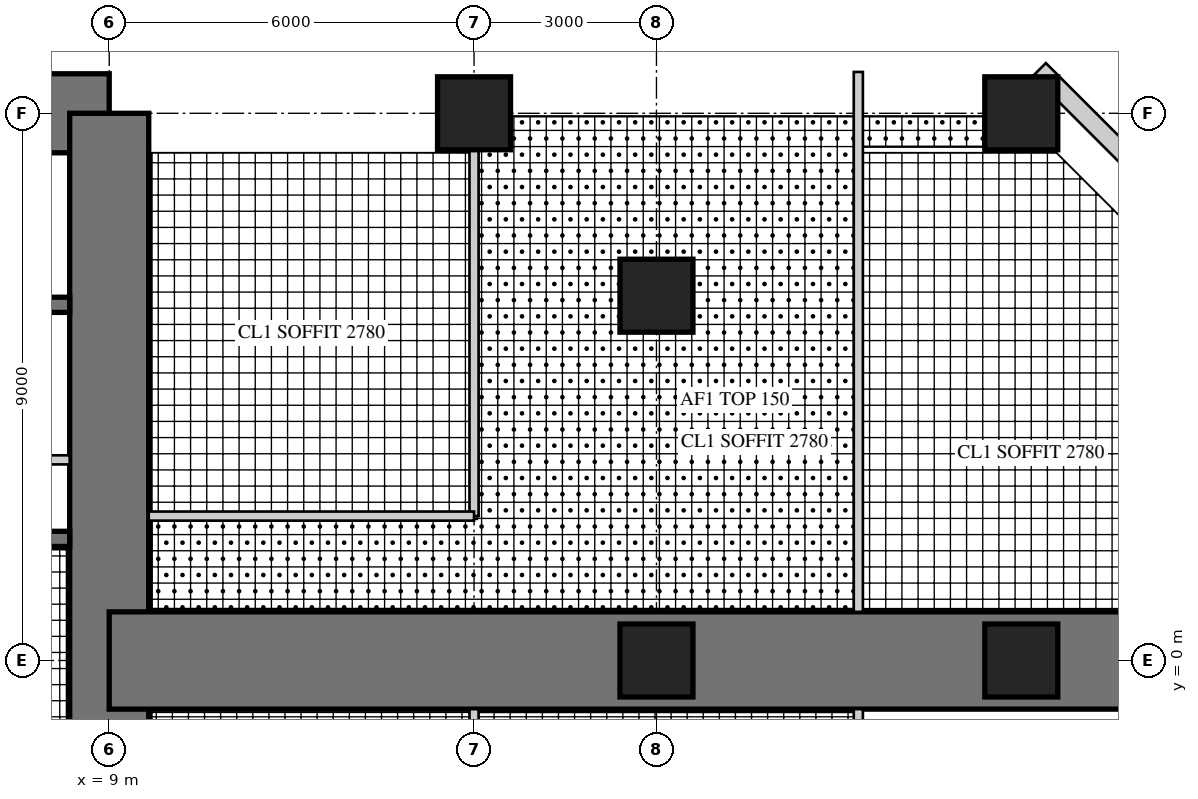
"""IFC4 building model, lengths in metres.
Left out: names, types, materials, properties, quantities, classifications, styles, units other than length and angle.
Written with IfcOpenShell. Run it as: python <this file> out.ifc"""

import sys

from ifc_helpers import new_model, si_unit, direction, frame, frame_2d, origin, origin_2d, place, context, subcontext, project, spatial, rectangle, extrude, element, fill, save


model = new_model("IFC4")
c1 = context("Model", 3, precision=1e-05, world=origin(), true_north=direction((0.0, 1.0)))
c2 = subcontext(c1, "Body", "Model", "MODEL_VIEW")
j1 = project(units=[si_unit("LENGTHUNIT", "METRE"), si_unit("PLANEANGLEUNIT", "RADIAN")], contexts=[c1])
p1 = place(None, origin())
s1 = spatial("IfcSite", under=j1, at=p1, CompositionType="ELEMENT")
p2 = place(p1, origin())
s2 = spatial("IfcBuilding", under=s1, at=p2, CompositionType="ELEMENT")
p3 = place(p2, frame((0.0, 0.0, 27.5)))
s3 = spatial("IfcBuildingStorey", under=s2, at=p3, CompositionType="ELEMENT", Elevation=27.5)
p4 = place(p3, frame((9.0, 9.0, 0.0), z_axis=(0.0, 0.0, 1.0), x_axis=(-1.0, 0.0, 0.0)))
e1 = element("IfcWall", 1, at=p4, inside=s3, PredefinedType="SHEAR", context=c2, shape_type="SweptSolid", body=[
    extrude(rectangle(XDim=18.0, YDim=1.3, at=frame_2d((9.0, 0.0))), origin(), (0.0, 0.0, 1.0), 4.0),
])
p5 = place(p4, frame((9.8, 0.0, 0.0)))
e2 = element("IfcOpeningElement", 2, at=p5, cuts=e1, PredefinedType="OPENING", context=c2, shape_type="SweptSolid", body=[
    extrude(rectangle(XDim=1.0, YDim=2.4, at=frame_2d((0.5, 1.2))), frame((0.0, 0.66, 0.0), z_axis=(0.0, -1.0, 0.0), x_axis=(1.0, 0.0, 0.0)), (0.0, 0.0, 1.0), 1.32),
])
p6 = place(p3, frame((9.0, -9.0, 0.0), z_axis=(0.0, 0.0, 1.0), x_axis=(0.0, 1.0, 0.0)))
e3 = element("IfcWall", 3, at=p6, inside=s3, PredefinedType="SHEAR", context=c2, shape_type="SweptSolid", body=[
    extrude(rectangle(XDim=18.0, YDim=1.3, at=frame_2d((9.0, 0.0))), origin(), (0.0, 0.0, 1.0), 4.0),
])
p7 = place(p6, frame((9.8, 0.0, 0.0)))
e4 = element("IfcOpeningElement", 4, at=p7, cuts=e3, PredefinedType="OPENING", context=c2, shape_type="SweptSolid", body=[
    extrude(rectangle(XDim=1.0, YDim=2.4, at=frame_2d((0.5, 1.2))), frame((0.0, 0.66, 0.0), z_axis=(0.0, -1.0, 0.0), x_axis=(1.0, 0.0, 0.0)), (0.0, 0.0, 1.0), 1.32),
])
p8 = place(p3, frame((1.925, 2.0, 0.0), z_axis=(0.0, 0.0, 1.0), x_axis=(1.0, 0.0, 0.0)))
e5 = element("IfcWall", 5, at=p8, inside=s3, PredefinedType="SHEAR", context=c2, shape_type="SweptSolid", body=[
    extrude(rectangle(XDim=6.425, YDim=0.25, at=frame_2d((3.212, 0.0))), origin(), (0.0, 0.0, 1.0), 4.0),
])
p9 = place(p3, frame((1.925, 5.85, 0.0), z_axis=(0.0, 0.0, 1.0), x_axis=(1.0, 0.0, 0.0)))
e6 = element("IfcWall", 6, at=p9, inside=s3, PredefinedType="SHEAR", context=c2, shape_type="SweptSolid", body=[
    extrude(rectangle(XDim=6.425, YDim=0.25, at=frame_2d((3.212, 0.0))), origin(), (0.0, 0.0, 1.0), 4.0),
])
p10 = place(p9, frame((0.454, 0.0, 0.0)))
e7 = element("IfcOpeningElement", 7, at=p10, cuts=e6, PredefinedType="OPENING", context=c2, shape_type="SweptSolid", body=[
    extrude(rectangle(XDim=1.1, YDim=2.2, at=frame_2d((0.55, 1.1))), frame((0.0, 0.135, 0.0), z_axis=(0.0, -1.0, 0.0), x_axis=(1.0, 0.0, 0.0)), (0.0, 0.0, 1.0), 0.27),
])
p11 = place(p9, frame((2.663, 0.0, 0.0)))
e8 = element("IfcOpeningElement", 8, at=p11, cuts=e6, PredefinedType="OPENING", context=c2, shape_type="SweptSolid", body=[
    extrude(rectangle(XDim=1.1, YDim=2.2, at=frame_2d((0.55, 1.1))), frame((0.0, 0.135, 0.0), z_axis=(0.0, -1.0, 0.0), x_axis=(1.0, 0.0, 0.0)), (0.0, 0.0, 1.0), 0.27),
])
p12 = place(p9, frame((4.871, 0.0, 0.0)))
e9 = element("IfcOpeningElement", 9, at=p12, cuts=e6, PredefinedType="OPENING", context=c2, shape_type="SweptSolid", body=[
    extrude(rectangle(XDim=1.1, YDim=2.2, at=frame_2d((0.55, 1.1))), frame((0.0, 0.135, 0.0), z_axis=(0.0, -1.0, 0.0), x_axis=(1.0, 0.0, 0.0)), (0.0, 0.0, 1.0), 0.27),
])
p13 = place(p3, frame((1.925, 3.3, 0.0), z_axis=(0.0, 0.0, 1.0), x_axis=(1.0, 0.0, 0.0)))
e10 = element("IfcWall", 10, at=p13, inside=s3, PredefinedType="PARTITIONING", context=c2, shape_type="SweptSolid", body=[
    extrude(rectangle(XDim=6.425, YDim=0.15, at=frame_2d((3.212, 0.0))), origin(), (0.0, 0.0, 1.0), 4.0),
])
p14 = place(p13, frame((0.075, 0.0, 0.0)))
e11 = element("IfcOpeningElement", 11, at=p14, cuts=e10, PredefinedType="OPENING", context=c2, shape_type="SweptSolid", body=[
    extrude(rectangle(XDim=0.8, YDim=2.1, at=frame_2d((0.4, 1.05))), frame((0.0, 0.085, 0.0), z_axis=(0.0, -1.0, 0.0), x_axis=(1.0, 0.0, 0.0)), (0.0, 0.0, 1.0), 0.17),
])
p15 = place(p13, frame((3.675, 0.0, 0.0)))
e12 = element("IfcOpeningElement", 12, at=p15, cuts=e10, PredefinedType="OPENING", context=c2, shape_type="SweptSolid", body=[
    extrude(rectangle(XDim=0.8, YDim=2.1, at=frame_2d((0.4, 1.05))), frame((0.0, 0.085, 0.0), z_axis=(0.0, -1.0, 0.0), x_axis=(1.0, 0.0, 0.0)), (0.0, 0.0, 1.0), 0.17),
])
p16 = place(p3, frame((9.0, 0.0, 0.0), z_axis=(0.0, 0.0, 1.0), x_axis=(1.0, 0.0, 0.0)))
e13 = element("IfcWall", 13, at=p16, inside=s3, PredefinedType="SHEAR", context=c2, shape_type="SweptSolid", body=[
    extrude(rectangle(XDim=18.0, YDim=1.6, at=frame_2d((9.0, 0.0))), origin(), (0.0, 0.0, 1.0), 4.0),
])
p17 = place(p16, frame((9.9, 0.0, 0.0)))
e14 = element("IfcOpeningElement", 14, at=p17, cuts=e13, PredefinedType="OPENING", context=c2, shape_type="SweptSolid", body=[
    extrude(rectangle(XDim=1.0, YDim=2.2, at=frame_2d((0.5, 1.1))), frame((0.0, 0.81, 0.0), z_axis=(0.0, -1.0, 0.0), x_axis=(1.0, 0.0, 0.0)), (0.0, 0.0, 1.0), 1.62),
])
for number, where, z_axis, x_axis in (
    (15, (15.0, 9.0, 0.0), (0.0, 0.0, 1.0), (1.0, 0.0, 0.0)),
    (16, (24.0, 9.0, 0.0), (0.0, 0.0, 1.0), (1.0, 0.0, 0.0)),
    (17, (18.0, 0.0, 0.0), (0.0, 0.0, 1.0), (1.0, 0.0, 0.0)),
    (18, (18.0, 6.0, 0.0), (0.0, 0.0, 1.0), (1.0, 0.0, 0.0)),
    (19, (24.0, 0.0, 0.0), (0.0, 0.0, 1.0), (1.0, 0.0, 0.0)),
):
    element("IfcColumn", number, at=place(p3, frame(where, z_axis=z_axis, x_axis=x_axis)), inside=s3, PredefinedType="COLUMN", context=c2, shape_type="SweptSolid", body=[
        extrude(rectangle(XDim=1.2, YDim=1.2, at=origin_2d()), origin(), (0.0, 0.0, 1.0), 4.0),
    ])
p18 = place(p3, frame((27.6, 6.418, 0.0), z_axis=(0.0, 0.0, 1.0), x_axis=(-0.707106781187, 0.707106781187, 0.0)))
e20 = element("IfcWall", 20, at=p18, inside=s3, PredefinedType="SOLIDWALL", context=c2, shape_type="SweptSolid", body=[
    extrude(rectangle(XDim=4.669, YDim=0.3, at=frame_2d((2.335, 0.0))), origin(), (0.0, 0.0, 1.0), 3.8),
])
p19 = place(p18, frame((1.885, 0.0, 0.3)))
e21 = element("IfcOpeningElement", 21, at=p19, cuts=e20, PredefinedType="OPENING", context=c2, shape_type="SweptSolid", body=[
    extrude(rectangle(XDim=0.9, YDim=2.4, at=frame_2d((0.45, 1.2))), frame((0.0, 0.16, 0.0), z_axis=(0.0, -1.0, 0.0), x_axis=(1.0, 0.0, 0.0)), (0.0, 0.0, 1.0), 0.32),
])
p20 = place(p3, frame((15.0, 2.375, 0.0), z_axis=(0.0, 0.0, 1.0), x_axis=(0.0, 1.0, 0.0)))
e22 = element("IfcWall", 22, at=p20, inside=s3, PredefinedType="PARTITIONING", context=c2, shape_type="SweptSolid", body=[
    extrude(rectangle(XDim=6.025, YDim=0.15, at=frame_2d((3.012, 0.0))), origin(), (0.0, 0.0, 1.0), 2.95),
])
p21 = place(p20, frame((2.512, 0.0, 0.0)))
e23 = element("IfcOpeningElement", 23, at=p21, cuts=e22, PredefinedType="OPENING", context=c2, shape_type="SweptSolid", body=[
    extrude(rectangle(XDim=1.0, YDim=2.1, at=frame_2d((0.5, 1.05))), frame((0.0, 0.085, 0.0), z_axis=(0.0, -1.0, 0.0), x_axis=(1.0, 0.0, 0.0)), (0.0, 0.0, 1.0), 0.17),
])
p22 = place(p3, frame((9.65, 2.375, 0.0), z_axis=(0.0, 0.0, 1.0), x_axis=(1.0, 0.0, 0.0)))
e24 = element("IfcWall", 24, at=p22, inside=s3, PredefinedType="PARTITIONING", context=c2, shape_type="SweptSolid", body=[
    extrude(rectangle(XDim=5.35, YDim=0.15, at=frame_2d((2.675, 0.0))), origin(), (0.0, 0.0, 1.0), 3.8),
])
p23 = place(p3, frame((15.0, -8.4, 0.0), z_axis=(0.0, 0.0, 1.0), x_axis=(0.0, 1.0, 0.0)))
e25 = element("IfcWall", 25, at=p23, inside=s3, PredefinedType="PARTITIONING", context=c2, shape_type="SweptSolid", body=[
    extrude(rectangle(XDim=7.6, YDim=0.15, at=frame_2d((3.8, 0.0))), origin(), (0.0, 0.0, 1.0), 2.95),
])
p24 = place(p23, frame((1.375, 0.0, 0.0)))
e26 = element("IfcOpeningElement", 26, at=p24, cuts=e25, PredefinedType="OPENING", context=c2, shape_type="SweptSolid", body=[
    extrude(rectangle(XDim=1.0, YDim=2.1, at=frame_2d((0.5, 1.05))), frame((0.0, 0.085, 0.0), z_axis=(0.0, -1.0, 0.0), x_axis=(1.0, 0.0, 0.0)), (0.0, 0.0, 1.0), 0.17),
])
p25 = place(p23, frame((5.175, 0.0, 0.0)))
e27 = element("IfcOpeningElement", 27, at=p25, cuts=e25, PredefinedType="OPENING", context=c2, shape_type="SweptSolid", body=[
    extrude(rectangle(XDim=1.0, YDim=2.1, at=frame_2d((0.5, 1.05))), frame((0.0, 0.085, 0.0), z_axis=(0.0, -1.0, 0.0), x_axis=(1.0, 0.0, 0.0)), (0.0, 0.0, 1.0), 0.17),
])
p26 = place(p3, frame((21.32, 0.8, 0.0), z_axis=(0.0, 0.0, 1.0), x_axis=(0.0, 1.0, 0.0)))
e28 = element("IfcWall", 28, at=p26, inside=s3, PredefinedType="PARTITIONING", context=c2, shape_type="SweptSolid", body=[
    extrude(rectangle(XDim=8.88, YDim=0.15, at=frame_2d((4.44, 0.0))), origin(), (0.0, 0.0, 1.0), 3.8),
])
p27 = place(p26, frame((0.45, 0.0, 0.0)))
e29 = element("IfcOpeningElement", 29, at=p27, cuts=e28, PredefinedType="OPENING", context=c2, shape_type="SweptSolid", body=[
    extrude(rectangle(XDim=1.0, YDim=2.2, at=frame_2d((0.5, 1.1))), frame((0.0, 0.085, 0.0), z_axis=(0.0, -1.0, 0.0), x_axis=(1.0, 0.0, 0.0)), (0.0, 0.0, 1.0), 0.17),
])
p28 = place(p3, frame((21.32, -9.68, 0.0), z_axis=(0.0, 0.0, 1.0), x_axis=(0.0, 1.0, 0.0)))
e30 = element("IfcWall", 30, at=p28, inside=s3, PredefinedType="PARTITIONING", context=c2, shape_type="SweptSolid", body=[
    extrude(rectangle(XDim=8.88, YDim=0.15, at=frame_2d((4.44, 0.0))), origin(), (0.0, 0.0, 1.0), 3.8),
])
p29 = place(p28, frame((5.087, 0.0, 0.0)))
e31 = element("IfcOpeningElement", 31, at=p29, cuts=e30, PredefinedType="OPENING", context=c2, shape_type="SweptSolid", body=[
    extrude(rectangle(XDim=1.0, YDim=2.2, at=frame_2d((0.5, 1.1))), frame((0.0, 0.085, 0.0), z_axis=(0.0, -1.0, 0.0), x_axis=(1.0, 0.0, 0.0)), (0.0, 0.0, 1.0), 0.17),
])
p30 = place(p28, frame((7.53, 0.0, 0.0)))
e32 = element("IfcOpeningElement", 32, at=p30, cuts=e30, PredefinedType="OPENING", context=c2, shape_type="SweptSolid", body=[
    extrude(rectangle(XDim=1.0, YDim=2.2, at=frame_2d((0.5, 1.1))), frame((0.0, 0.085, 0.0), z_axis=(0.0, -1.0, 0.0), x_axis=(1.0, 0.0, 0.0)), (0.0, 0.0, 1.0), 0.17),
])
p31 = place(p21, origin())
e33 = element("IfcDoor", 33, at=p31, inside=s3, OperationType="SINGLE_SWING_LEFT", PredefinedType="DOOR", context=c2, shape_type="SweptSolid", body=[
    extrude(rectangle(XDim=1.0, YDim=2.1, at=frame_2d((0.5, 1.05))), frame((0.0, 0.025, 0.0), z_axis=(0.0, -1.0, 0.0), x_axis=(1.0, 0.0, 0.0)), (0.0, 0.0, 1.0), 0.05),
])
fill(e23, e33)
p32 = place(p27, frame((1.0, 0.0, 0.0), z_axis=(0.0, 0.0, 1.0), x_axis=(-1.0, 0.0, 0.0)))
e34 = element("IfcDoor", 34, at=p32, inside=s3, OperationType="SINGLE_SWING_RIGHT", PredefinedType="DOOR", context=c2, shape_type="SweptSolid", body=[
    extrude(rectangle(XDim=1.0, YDim=2.2, at=frame_2d((0.5, 1.1))), frame((0.0, 0.025, 0.0), z_axis=(0.0, -1.0, 0.0), x_axis=(1.0, 0.0, 0.0)), (0.0, 0.0, 1.0), 0.05),
])
fill(e29, e34)
p33 = place(p17, frame((1.0, 0.0, 0.0), z_axis=(0.0, 0.0, 1.0), x_axis=(-1.0, 0.0, 0.0)))
e35 = element("IfcDoor", 35, at=p33, inside=s3, OperationType="SINGLE_SWING_LEFT", PredefinedType="DOOR", context=c2, shape_type="SweptSolid", body=[
    extrude(rectangle(XDim=1.0, YDim=2.2, at=frame_2d((0.5, 1.1))), frame((0.0, 0.025, 0.0), z_axis=(0.0, -1.0, 0.0), x_axis=(1.0, 0.0, 0.0)), (0.0, 0.0, 1.0), 0.05),
])
fill(e14, e35)
p34 = place(p7, frame((1.0, 0.0, 0.0), z_axis=(0.0, 0.0, 1.0), x_axis=(-1.0, 0.0, 0.0)))
e36 = element("IfcDoor", 36, at=p34, inside=s3, OperationType="SINGLE_SWING_RIGHT", PredefinedType="DOOR", context=c2, shape_type="SweptSolid", body=[
    extrude(rectangle(XDim=1.0, YDim=2.4, at=frame_2d((0.5, 1.2))), frame((0.0, -0.005, 0.0), z_axis=(0.0, -1.0, 0.0), x_axis=(1.0, 0.0, 0.0)), (0.0, 0.0, 1.0), 0.05),
])
fill(e4, e36)
save(model, sys.argv[1])
